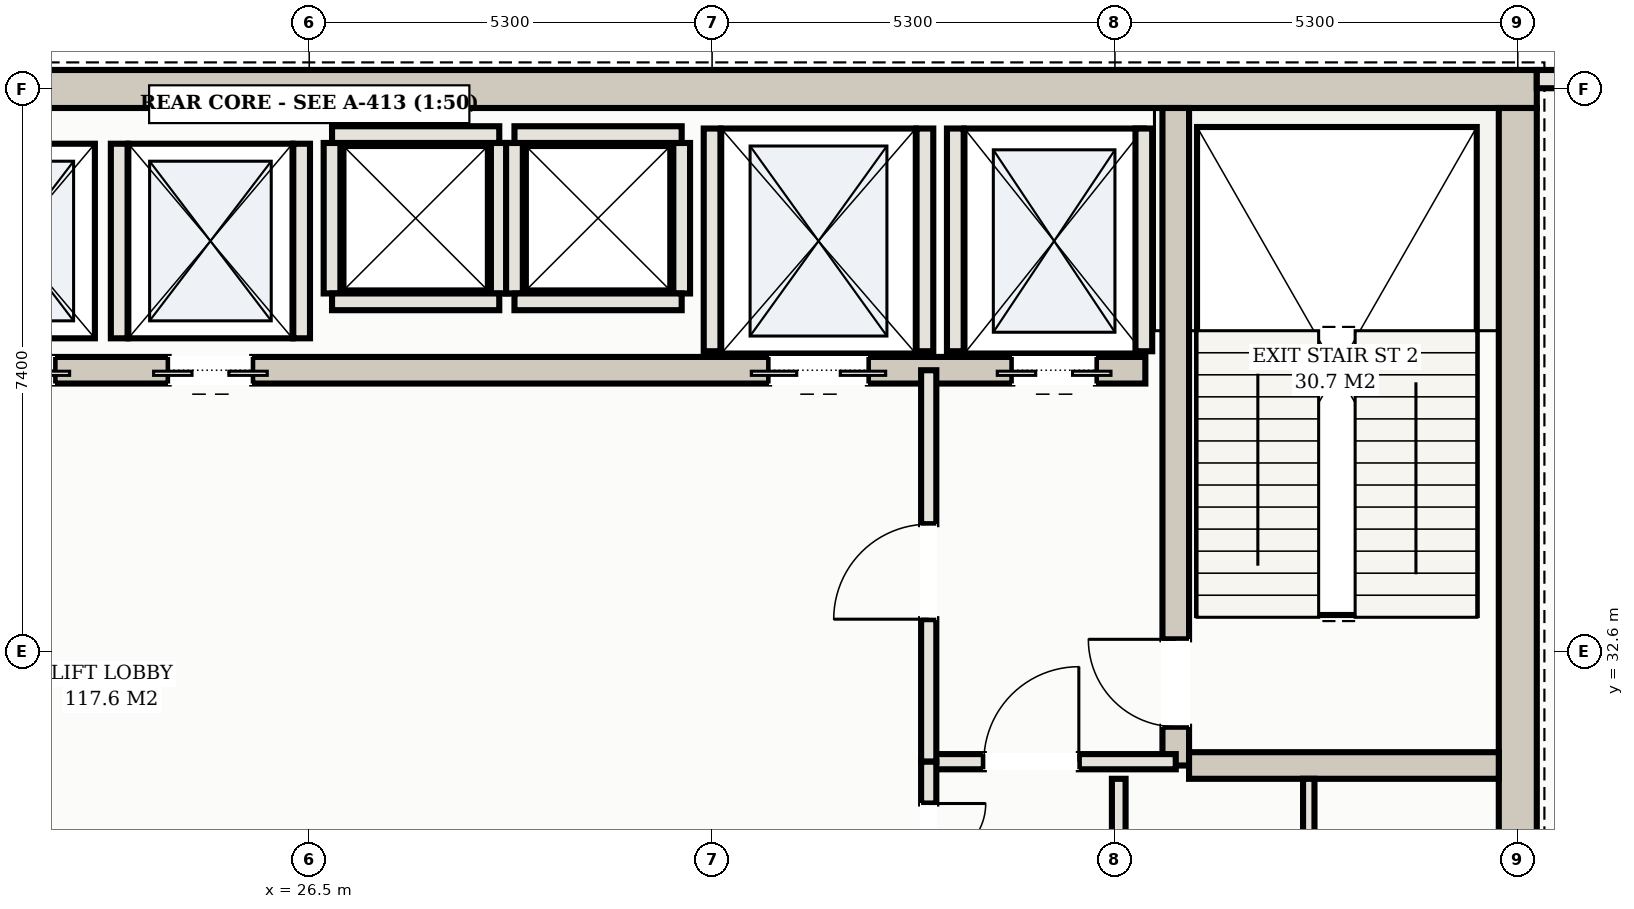
"""IFC4 building model, lengths in metres.
Left out: names, types, materials, properties, quantities, classifications, styles, units other than length and angle.
Written with IfcOpenShell. Run it as: python <this file> out.ifc"""

import sys

from ifc_helpers import new_model, si_unit, direction, frame, frame_2d, origin, place, context, subcontext, project, spatial, rectangle, extrude, element, fill, save


model = new_model("IFC4")
c1 = context("Model", 3, precision=1e-05, world=origin(), true_north=direction((0.0, 1.0)))
c2 = subcontext(c1, "Body", "Model", "MODEL_VIEW")
j1 = project(units=[si_unit("LENGTHUNIT", "METRE"), si_unit("PLANEANGLEUNIT", "RADIAN")], contexts=[c1])
p1 = place(None, origin())
s1 = spatial("IfcSite", under=j1, at=p1, CompositionType="ELEMENT")
p2 = place(p1, origin())
s2 = spatial("IfcBuilding", under=s1, at=p2, CompositionType="ELEMENT")
p3 = place(p2, frame((0.0, 0.0, 192.2)))
s3 = spatial("IfcBuildingStorey", under=s2, at=p3, CompositionType="ELEMENT", Elevation=192.2)
p4 = place(p3, frame((10.35, 40.0, 0.0), z_axis=(0.0, 0.0, 1.0), x_axis=(1.0, 0.0, 0.0)))
e1 = element("IfcWall", 1, at=p4, inside=s3, PredefinedType="SHEAR", context=c2, shape_type="SweptSolid", body=[
    extrude(rectangle(XDim=32.3, YDim=0.5, at=frame_2d((16.15, 0.0))), origin(), (0.0, 0.0, 1.0), 4.31),
])
p5 = place(p3, frame((42.4, 25.45, 0.0), z_axis=(0.0, 0.0, 1.0), x_axis=(0.0, 1.0, 0.0)))
e2 = element("IfcWall", 2, at=p5, inside=s3, PredefinedType="SHEAR", context=c2, shape_type="SweptSolid", body=[
    extrude(rectangle(XDim=14.3, YDim=0.5, at=frame_2d((7.15, 0.0))), origin(), (0.0, 0.0, 1.0), 4.31),
])
p6 = place(p3, frame((37.9, 31.1, 0.0), z_axis=(0.0, 0.0, 1.0), x_axis=(0.0, 1.0, 0.0)))
e3 = element("IfcWall", 3, at=p6, inside=s3, PredefinedType="SHEAR", context=c2, shape_type="SweptSolid", body=[
    extrude(rectangle(XDim=8.65, YDim=0.35, at=frame_2d((4.325, 0.0))), origin(), (0.0, 0.0, 1.0), 4.31),
])
p7 = place(p6, frame((0.51, 0.0, 0.0)))
e4 = element("IfcOpeningElement", 4, at=p7, cuts=e3, PredefinedType="OPENING", context=c2, shape_type="SweptSolid", body=[
    extrude(rectangle(XDim=1.15, YDim=2.2, at=frame_2d((0.575, 1.1))), frame((0.0, 0.185, 0.0), z_axis=(0.0, -1.0, 0.0), x_axis=(1.0, 0.0, 0.0)), (0.0, 0.0, 1.0), 0.37),
])
p8 = place(p3, frame((38.075, 31.1, 0.0), z_axis=(0.0, 0.0, 1.0), x_axis=(1.0, 0.0, 0.0)))
e5 = element("IfcWall", 5, at=p8, inside=s3, PredefinedType="SHEAR", context=c2, shape_type="SweptSolid", body=[
    extrude(rectangle(XDim=4.075, YDim=0.35, at=frame_2d((2.038, 0.0))), origin(), (0.0, 0.0, 1.0), 4.31),
])
p9 = place(p3, frame((15.5, 36.3, 0.0), z_axis=(0.0, 0.0, 1.0), x_axis=(1.0, 0.0, 0.0)))
e6 = element("IfcWall", 6, at=p9, inside=s3, PredefinedType="SHEAR", context=c2, shape_type="SweptSolid", body=[
    extrude(rectangle(XDim=22.0, YDim=0.35, at=frame_2d((11.0, 0.0))), origin(), (0.0, 0.0, 1.0), 4.31),
])
p10 = place(p9, frame((0.65, 0.0, 0.0)))
e7 = element("IfcOpeningElement", 7, at=p10, cuts=e6, PredefinedType="OPENING", context=c2, shape_type="SweptSolid", body=[
    extrude(rectangle(XDim=1.1, YDim=2.15, at=frame_2d((0.55, 1.075))), frame((0.0, 0.185, 0.0), z_axis=(0.0, -1.0, 0.0), x_axis=(1.0, 0.0, 0.0)), (0.0, 0.0, 1.0), 0.37),
])
p11 = place(p9, frame((20.25, 0.0, 0.0)))
e8 = element("IfcOpeningElement", 8, at=p11, cuts=e6, PredefinedType="OPENING", context=c2, shape_type="SweptSolid", body=[
    extrude(rectangle(XDim=1.1, YDim=2.15, at=frame_2d((0.55, 1.075))), frame((0.0, 0.185, 0.0), z_axis=(0.0, -1.0, 0.0), x_axis=(1.0, 0.0, 0.0)), (0.0, 0.0, 1.0), 0.37),
])
p12 = place(p9, frame((17.05, 0.0, 0.0)))
e9 = element("IfcOpeningElement", 9, at=p12, cuts=e6, PredefinedType="OPENING", context=c2, shape_type="SweptSolid", body=[
    extrude(rectangle(XDim=1.3, YDim=2.2, at=frame_2d((0.65, 1.1))), frame((0.0, 0.185, 0.0), z_axis=(0.0, -1.0, 0.0), x_axis=(1.0, 0.0, 0.0)), (0.0, 0.0, 1.0), 0.37),
])
p13 = place(p9, frame((3.95, 0.0, 0.0)))
e10 = element("IfcOpeningElement", 10, at=p13, cuts=e6, PredefinedType="OPENING", context=c2, shape_type="SweptSolid", body=[
    extrude(rectangle(XDim=1.1, YDim=2.15, at=frame_2d((0.55, 1.075))), frame((0.0, 0.185, 0.0), z_axis=(0.0, -1.0, 0.0), x_axis=(1.0, 0.0, 0.0)), (0.0, 0.0, 1.0), 0.37),
])
p14 = place(p9, frame((6.55, 0.0, 0.0)))
e11 = element("IfcOpeningElement", 11, at=p14, cuts=e6, PredefinedType="OPENING", context=c2, shape_type="SweptSolid", body=[
    extrude(rectangle(XDim=1.1, YDim=2.15, at=frame_2d((0.55, 1.075))), frame((0.0, 0.185, 0.0), z_axis=(0.0, -1.0, 0.0), x_axis=(1.0, 0.0, 0.0)), (0.0, 0.0, 1.0), 0.37),
])
p15 = place(p9, frame((9.15, 0.0, 0.0)))
e12 = element("IfcOpeningElement", 12, at=p15, cuts=e6, PredefinedType="OPENING", context=c2, shape_type="SweptSolid", body=[
    extrude(rectangle(XDim=1.1, YDim=2.15, at=frame_2d((0.55, 1.075))), frame((0.0, 0.185, 0.0), z_axis=(0.0, -1.0, 0.0), x_axis=(1.0, 0.0, 0.0)), (0.0, 0.0, 1.0), 0.37),
])
for number, where, z_axis, x_axis in (
    (13, (35.0, 36.55, 0.0), (0.0, 0.0, 1.0), (0.0, 1.0, 0.0)),
    (14, (37.48, 36.55, 0.0), (0.0, 0.0, 1.0), (0.0, 1.0, 0.0)),
    (15, (31.8, 36.55, 0.0), (0.0, 0.0, 1.0), (0.0, 1.0, 0.0)),
    (16, (34.6, 36.55, 0.0), (0.0, 0.0, 1.0), (0.0, 1.0, 0.0)),
):
    element("IfcWall", number, at=place(p3, frame(where, z_axis=z_axis, x_axis=x_axis)), inside=s3, PredefinedType="SOLIDWALL", context=c2, shape_type="SweptSolid", body=[
        extrude(rectangle(XDim=2.93, YDim=0.22, at=frame_2d((1.465, 0.0))), origin(), (0.0, 0.0, 1.0), 4.31),
    ])
for number, where, z_axis, x_axis in (
    (17, (24.0, 36.72, 0.0), (0.0, 0.0, 1.0), (0.0, 1.0, 0.0)),
    (18, (26.4, 36.72, 0.0), (0.0, 0.0, 1.0), (0.0, 1.0, 0.0)),
):
    element("IfcWall", number, at=place(p3, frame(where, z_axis=z_axis, x_axis=x_axis)), inside=s3, PredefinedType="SOLIDWALL", context=c2, shape_type="SweptSolid", body=[
        extrude(rectangle(XDim=2.56, YDim=0.22, at=frame_2d((1.28, 0.0))), origin(), (0.0, 0.0, 1.0), 4.31),
    ])
for number, where, z_axis, x_axis in (
    (19, (26.8, 37.31, 0.0), (0.0, 0.0, 1.0), (0.0, 1.0, 0.0)),
    (20, (29.0, 37.31, 0.0), (0.0, 0.0, 1.0), (0.0, 1.0, 0.0)),
):
    element("IfcWall", number, at=place(p3, frame(where, z_axis=z_axis, x_axis=x_axis)), inside=s3, PredefinedType="SOLIDWALL", context=c2, shape_type="SweptSolid", body=[
        extrude(rectangle(XDim=1.98, YDim=0.22, at=frame_2d((0.99, 0.0))), origin(), (0.0, 0.0, 1.0), 4.31),
    ])
for number, where, z_axis, x_axis in (
    (21, (26.8, 39.4, 0.0), (0.0, 0.0, 1.0), (1.0, 0.0, 0.0)),
    (22, (26.8, 37.2, 0.0), (0.0, 0.0, 1.0), (1.0, 0.0, 0.0)),
):
    element("IfcWall", number, at=place(p3, frame(where, z_axis=z_axis, x_axis=x_axis)), inside=s3, PredefinedType="SOLIDWALL", context=c2, shape_type="SweptSolid", body=[
        extrude(rectangle(XDim=2.2, YDim=0.22, at=frame_2d((1.1, 0.0))), origin(), (0.0, 0.0, 1.0), 4.31),
    ])
for number, where, z_axis, x_axis in (
    (23, (29.2, 37.31, 0.0), (0.0, 0.0, 1.0), (0.0, 1.0, 0.0)),
    (24, (31.4, 37.31, 0.0), (0.0, 0.0, 1.0), (0.0, 1.0, 0.0)),
):
    element("IfcWall", number, at=place(p3, frame(where, z_axis=z_axis, x_axis=x_axis)), inside=s3, PredefinedType="SOLIDWALL", context=c2, shape_type="SweptSolid", body=[
        extrude(rectangle(XDim=1.98, YDim=0.22, at=frame_2d((0.99, 0.0))), origin(), (0.0, 0.0, 1.0), 4.31),
    ])
for number, where, z_axis, x_axis in (
    (25, (29.2, 39.4, 0.0), (0.0, 0.0, 1.0), (1.0, 0.0, 0.0)),
    (26, (29.2, 37.2, 0.0), (0.0, 0.0, 1.0), (1.0, 0.0, 0.0)),
):
    element("IfcWall", number, at=place(p3, frame(where, z_axis=z_axis, x_axis=x_axis)), inside=s3, PredefinedType="SOLIDWALL", context=c2, shape_type="SweptSolid", body=[
        extrude(rectangle(XDim=2.2, YDim=0.22, at=frame_2d((1.1, 0.0))), origin(), (0.0, 0.0, 1.0), 4.31),
    ])
p16 = place(p3, frame((42.95, 40.13, 0.0), z_axis=(0.0, 0.0, 1.0), x_axis=(-1.0, 0.0, 0.0)))
e27 = element("IfcWall", 27, at=p16, inside=s3, PredefinedType="SOLIDWALL", context=c2, shape_type="SweptSolid", body=[
    extrude(rectangle(XDim=0.3, YDim=0.24, at=frame_2d((0.15, 0.0))), origin(), (0.0, 0.0, 1.0), 4.31),
])
p17 = place(p3, frame((34.65, 31.15, 0.0), z_axis=(0.0, 0.0, 1.0), x_axis=(1.0, 0.0, 0.0)))
e28 = element("IfcWall", 28, at=p17, inside=s3, PredefinedType="PARTITIONING", context=c2, shape_type="SweptSolid", body=[
    extrude(rectangle(XDim=3.25, YDim=0.2, at=frame_2d((1.625, 0.0))), origin(), (0.0, 0.0, 1.0), 4.31),
])
p18 = place(p17, frame((0.725, 0.0, 0.0)))
e29 = element("IfcOpeningElement", 29, at=p18, cuts=e28, PredefinedType="OPENING", context=c2, shape_type="SweptSolid", body=[
    extrude(rectangle(XDim=1.25, YDim=2.2, at=frame_2d((0.625, 1.1))), frame((0.0, 0.11, 0.0), z_axis=(0.0, -1.0, 0.0), x_axis=(1.0, 0.0, 0.0)), (0.0, 0.0, 1.0), 0.22),
])
p19 = place(p3, frame((34.65, 31.15, 0.0), z_axis=(0.0, 0.0, 1.0), x_axis=(0.0, 1.0, 0.0)))
e30 = element("IfcWall", 30, at=p19, inside=s3, PredefinedType="PARTITIONING", context=c2, shape_type="SweptSolid", body=[
    extrude(rectangle(XDim=5.15, YDim=0.2, at=frame_2d((2.575, 0.0))), origin(), (0.0, 0.0, 1.0), 4.31),
])
p20 = place(p19, frame((1.875, 0.0, 0.0)))
e31 = element("IfcOpeningElement", 31, at=p20, cuts=e30, PredefinedType="OPENING", context=c2, shape_type="SweptSolid", body=[
    extrude(rectangle(XDim=1.25, YDim=2.2, at=frame_2d((0.625, 1.1))), frame((0.0, 0.11, 0.0), z_axis=(0.0, -1.0, 0.0), x_axis=(1.0, 0.0, 0.0)), (0.0, 0.0, 1.0), 0.22),
])
p21 = place(p3, frame((37.15, 25.45, 0.0), z_axis=(0.0, 0.0, 1.0), x_axis=(0.0, 1.0, 0.0)))
e32 = element("IfcWall", 32, at=p21, inside=s3, PredefinedType="PARTITIONING", context=c2, shape_type="SweptSolid", body=[
    extrude(rectangle(XDim=5.475, YDim=0.18, at=frame_2d((2.738, 0.0))), origin(), (0.0, 0.0, 1.0), 3.655),
])
p22 = place(p21, frame((0.765, 0.0, 0.0)))
e33 = element("IfcOpeningElement", 33, at=p22, cuts=e32, PredefinedType="OPENING", context=c2, shape_type="SweptSolid", body=[
    extrude(rectangle(XDim=0.92, YDim=2.15, at=frame_2d((0.46, 1.075))), frame((0.0, 0.1, 0.0), z_axis=(0.0, -1.0, 0.0), x_axis=(1.0, 0.0, 0.0)), (0.0, 0.0, 1.0), 0.2),
])
p23 = place(p21, frame((3.452, 0.0, 0.0)))
e34 = element("IfcOpeningElement", 34, at=p23, cuts=e32, PredefinedType="OPENING", context=c2, shape_type="SweptSolid", body=[
    extrude(rectangle(XDim=0.92, YDim=2.15, at=frame_2d((0.46, 1.075))), frame((0.0, 0.1, 0.0), z_axis=(0.0, -1.0, 0.0), x_axis=(1.0, 0.0, 0.0)), (0.0, 0.0, 1.0), 0.2),
])
p24 = place(p3, frame((39.65, 27.85, 0.0), z_axis=(0.0, 0.0, 1.0), x_axis=(0.0, 1.0, 0.0)))
e35 = element("IfcWall", 35, at=p24, inside=s3, PredefinedType="PARTITIONING", context=c2, shape_type="SweptSolid", body=[
    extrude(rectangle(XDim=3.075, YDim=0.15, at=frame_2d((1.538, 0.0))), origin(), (0.0, 0.0, 1.0), 4.31),
])
p25 = place(p24, frame((1.078, 0.0, 0.0)))
e36 = element("IfcOpeningElement", 36, at=p25, cuts=e35, PredefinedType="OPENING", context=c2, shape_type="SweptSolid", body=[
    extrude(rectangle(XDim=0.92, YDim=2.15, at=frame_2d((0.46, 1.075))), frame((0.0, 0.085, 0.0), z_axis=(0.0, -1.0, 0.0), x_axis=(1.0, 0.0, 0.0)), (0.0, 0.0, 1.0), 0.17),
])
p26 = place(p3, frame((34.65, 28.55, 0.0), z_axis=(0.0, 0.0, 1.0), x_axis=(0.0, 1.0, 0.0)))
e37 = element("IfcWall", 37, at=p26, inside=s3, PredefinedType="PARTITIONING", context=c2, shape_type="SweptSolid", body=[
    extrude(rectangle(XDim=2.6, YDim=0.2, at=frame_2d((1.3, 0.0))), origin(), (0.0, 0.0, 1.0), 4.31),
])
p27 = place(p26, frame((0.55, 0.0, 0.0)))
e38 = element("IfcOpeningElement", 38, at=p27, cuts=e37, PredefinedType="OPENING", context=c2, shape_type="SweptSolid", body=[
    extrude(rectangle(XDim=1.5, YDim=2.25, at=frame_2d((0.75, 1.125))), frame((0.0, 0.11, 0.0), z_axis=(0.0, -1.0, 0.0), x_axis=(1.0, 0.0, 0.0)), (0.0, 0.0, 1.0), 0.22),
])
p28 = place(p11, frame((1.1, 0.0, 0.0), z_axis=(0.0, 0.0, 1.0), x_axis=(-1.0, 0.0, 0.0)))
e39 = element("IfcDoor", 39, at=p28, inside=s3, OperationType="DOUBLE_DOOR_SLIDING", PredefinedType="DOOR", context=c2, shape_type="SweptSolid", body=[
    extrude(rectangle(XDim=1.1, YDim=2.15, at=frame_2d((0.55, 1.075))), frame((0.0, 0.025, 0.0), z_axis=(0.0, -1.0, 0.0), x_axis=(1.0, 0.0, 0.0)), (0.0, 0.0, 1.0), 0.05),
])
fill(e8, e39)
p29 = place(p12, frame((1.3, 0.0, 0.0), z_axis=(0.0, 0.0, 1.0), x_axis=(-1.0, 0.0, 0.0)))
e40 = element("IfcDoor", 40, at=p29, inside=s3, OperationType="DOUBLE_DOOR_SLIDING", PredefinedType="DOOR", context=c2, shape_type="SweptSolid", body=[
    extrude(rectangle(XDim=1.3, YDim=2.2, at=frame_2d((0.65, 1.1))), frame((0.0, 0.025, 0.0), z_axis=(0.0, -1.0, 0.0), x_axis=(1.0, 0.0, 0.0)), (0.0, 0.0, 1.0), 0.05),
])
fill(e9, e40)
p30 = place(p14, frame((1.1, 0.0, 0.0), z_axis=(0.0, 0.0, 1.0), x_axis=(-1.0, 0.0, 0.0)))
e41 = element("IfcDoor", 41, at=p30, inside=s3, OperationType="DOUBLE_DOOR_SLIDING", PredefinedType="DOOR", context=c2, shape_type="SweptSolid", body=[
    extrude(rectangle(XDim=1.1, YDim=2.15, at=frame_2d((0.55, 1.075))), frame((0.0, 0.025, 0.0), z_axis=(0.0, -1.0, 0.0), x_axis=(1.0, 0.0, 0.0)), (0.0, 0.0, 1.0), 0.05),
])
fill(e11, e41)
p31 = place(p15, frame((1.1, 0.0, 0.0), z_axis=(0.0, 0.0, 1.0), x_axis=(-1.0, 0.0, 0.0)))
e42 = element("IfcDoor", 42, at=p31, inside=s3, OperationType="DOUBLE_DOOR_SLIDING", PredefinedType="DOOR", context=c2, shape_type="SweptSolid", body=[
    extrude(rectangle(XDim=1.1, YDim=2.15, at=frame_2d((0.55, 1.075))), frame((0.0, 0.025, 0.0), z_axis=(0.0, -1.0, 0.0), x_axis=(1.0, 0.0, 0.0)), (0.0, 0.0, 1.0), 0.05),
])
fill(e12, e42)
p32 = place(p18, origin())
e43 = element("IfcDoor", 43, at=p32, inside=s3, OperationType="SINGLE_SWING_RIGHT", PredefinedType="DOOR", context=c2, shape_type="SweptSolid", body=[
    extrude(rectangle(XDim=1.25, YDim=2.2, at=frame_2d((0.625, 1.1))), frame((0.0, 0.025, 0.0), z_axis=(0.0, -1.0, 0.0), x_axis=(1.0, 0.0, 0.0)), (0.0, 0.0, 1.0), 0.05),
])
fill(e29, e43)
p33 = place(p20, origin())
e44 = element("IfcDoor", 44, at=p33, inside=s3, OperationType="SINGLE_SWING_LEFT", PredefinedType="DOOR", context=c2, shape_type="SweptSolid", body=[
    extrude(rectangle(XDim=1.25, YDim=2.2, at=frame_2d((0.625, 1.1))), frame((0.0, 0.025, 0.0), z_axis=(0.0, -1.0, 0.0), x_axis=(1.0, 0.0, 0.0)), (0.0, 0.0, 1.0), 0.05),
])
fill(e31, e44)
p34 = place(p7, origin())
e45 = element("IfcDoor", 45, at=p34, inside=s3, OperationType="SINGLE_SWING_RIGHT", PredefinedType="DOOR", context=c2, shape_type="SweptSolid", body=[
    extrude(rectangle(XDim=1.15, YDim=2.2, at=frame_2d((0.575, 1.1))), frame((0.0, 0.025, 0.0), z_axis=(0.0, -1.0, 0.0), x_axis=(1.0, 0.0, 0.0)), (0.0, 0.0, 1.0), 0.05),
])
fill(e4, e45)
p35 = place(p27, frame((1.5, 0.0, 0.0), z_axis=(0.0, 0.0, 1.0), x_axis=(-1.0, 0.0, 0.0)))
e46 = element("IfcDoor", 46, at=p35, inside=s3, OperationType="DOUBLE_DOOR_SINGLE_SWING", PredefinedType="DOOR", context=c2, shape_type="SweptSolid", body=[
    extrude(rectangle(XDim=1.5, YDim=2.25, at=frame_2d((0.75, 1.125))), frame((0.0, 0.025, 0.0), z_axis=(0.0, -1.0, 0.0), x_axis=(1.0, 0.0, 0.0)), (0.0, 0.0, 1.0), 0.05),
])
fill(e38, e46)
save(model, sys.argv[1])
